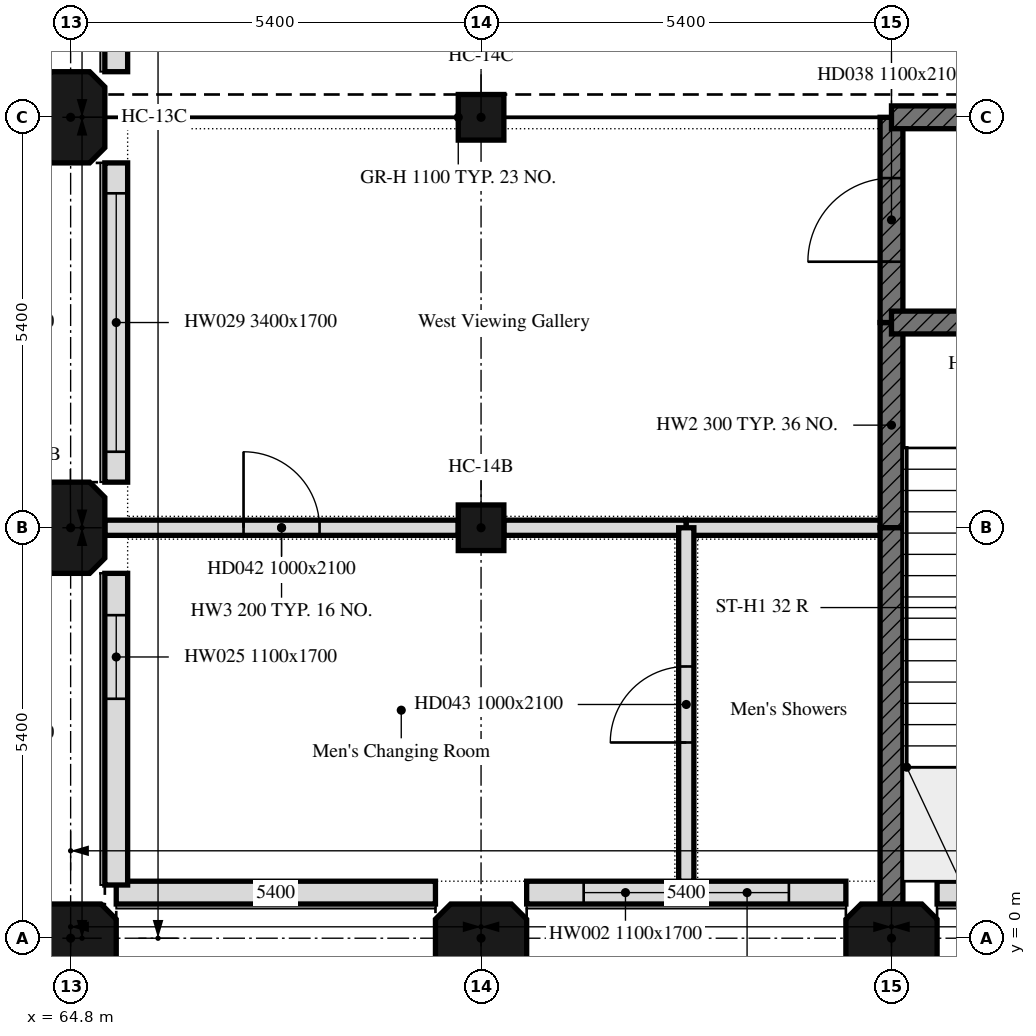
"""IFC4 building model, lengths in metres.
Left out: names, types, materials, properties, quantities, classifications, styles, units other than length and angle.
Written with IfcOpenShell. Run it as: python <this file> out.ifc"""

import sys

from ifc_helpers import new_model, si_unit, direction, frame, frame_2d, origin, origin_2d, place, context, subcontext, project, spatial, polyline, rectangle, outline, extrude, element, fill, save


model = new_model("IFC4")
c1 = context("Model", 3, precision=1e-05, world=origin(), true_north=direction((0.0, 1.0)))
c2 = subcontext(c1, "Body", "Model", "MODEL_VIEW")
j1 = project(units=[si_unit("LENGTHUNIT", "METRE"), si_unit("PLANEANGLEUNIT", "RADIAN")], contexts=[c1])
p1 = place(None, origin())
s1 = spatial("IfcSite", under=j1, at=p1, CompositionType="ELEMENT")
p2 = place(p1, origin())
s2 = spatial("IfcBuilding", under=s1, at=p2, CompositionType="ELEMENT")
p3 = place(p2, frame((0.0, 0.0, 8.4)))
s3 = spatial("IfcBuildingStorey", under=s2, at=p3, CompositionType="ELEMENT", Elevation=8.4)
for number, where, z_axis, x_axis in (
    (1, (64.8, 0.0, 0.0), (0.0, 0.0, 1.0), (1.0, 0.0, 0.0)),
    (2, (64.8, 5.4, 0.0), (0.0, 0.0, 1.0), (0.0, 1.0, 0.0)),
    (3, (64.8, 10.8, 0.0), (0.0, 0.0, 1.0), (0.0, 1.0, 0.0)),
    (4, (70.2, 0.0, 0.0), (0.0, 0.0, 1.0), (1.0, 0.0, 0.0)),
):
    element("IfcColumn", number, at=place(p3, frame(where, z_axis=z_axis, x_axis=x_axis)), inside=s3, PredefinedType="COLUMN", context=c2, shape_type="SweptSolid", body=[
        extrude(outline(polyline([(-0.4, -0.45), (0.4, -0.45), (0.6, -0.25), (0.6, 0.25), (0.4, 0.45), (-0.4, 0.45), (-0.6, 0.25), (-0.6, -0.25), (-0.4, -0.45)])), origin(), (0.0, 0.0, 1.0), 5.7),
    ])
for number, where, z_axis, x_axis in (
    (5, (70.2, 5.4, 0.0), (0.0, 0.0, 1.0), (1.0, 0.0, 0.0)),
    (6, (70.2, 10.8, 0.0), (0.0, 0.0, 1.0), (1.0, 0.0, 0.0)),
):
    element("IfcColumn", number, at=place(p3, frame(where, z_axis=z_axis, x_axis=x_axis)), inside=s3, PredefinedType="COLUMN", context=c2, shape_type="SweptSolid", body=[
        extrude(rectangle(XDim=0.6, YDim=0.6, at=origin_2d()), origin(), (0.0, 0.0, 1.0), 5.7),
    ])
p4 = place(p3, frame((75.6, 0.0, 0.0), z_axis=(0.0, 0.0, 1.0), x_axis=(1.0, 0.0, 0.0)))
e7 = element("IfcColumn", 7, at=p4, inside=s3, PredefinedType="COLUMN", context=c2, shape_type="SweptSolid", body=[
    extrude(outline(polyline([(-0.4, -0.45), (0.4, -0.45), (0.6, -0.25), (0.6, 0.25), (0.4, 0.45), (-0.4, 0.45), (-0.6, 0.25), (-0.6, -0.25), (-0.4, -0.45)])), origin(), (0.0, 0.0, 1.0), 5.7),
])
p5 = place(p3, frame((65.4, 0.6, 0.0), z_axis=(0.0, 0.0, 1.0), x_axis=(1.0, 0.0, 0.0)))
e8 = element("IfcWall", 8, at=p5, inside=s3, PredefinedType="SOLIDWALL", context=c2, shape_type="SweptSolid", body=[
    extrude(rectangle(XDim=4.2, YDim=0.3, at=frame_2d((2.1, 0.0))), origin(), (0.0, 0.0, 1.0), 5.7),
])
p6 = place(p3, frame((70.8, 0.6, 0.0), z_axis=(0.0, 0.0, 1.0), x_axis=(1.0, 0.0, 0.0)))
e9 = element("IfcWall", 9, at=p6, inside=s3, PredefinedType="SOLIDWALL", context=c2, shape_type="SweptSolid", body=[
    extrude(rectangle(XDim=4.2, YDim=0.3, at=frame_2d((2.1, 0.0))), origin(), (0.0, 0.0, 1.0), 5.7),
])
p7 = place(p6, frame((0.75, 0.0, 0.9)))
e10 = element("IfcOpeningElement", 10, at=p7, cuts=e9, PredefinedType="OPENING", context=c2, shape_type="SweptSolid", body=[
    extrude(rectangle(XDim=1.1, YDim=1.7, at=frame_2d((0.55, 0.85))), frame((0.0, 0.15, 0.0), z_axis=(0.0, -1.0, 0.0), x_axis=(1.0, 0.0, 0.0)), (0.0, 0.0, 1.0), 0.3),
])
p8 = place(p6, frame((2.35, 0.0, 0.9)))
e11 = element("IfcOpeningElement", 11, at=p8, cuts=e9, PredefinedType="OPENING", context=c2, shape_type="SweptSolid", body=[
    extrude(rectangle(XDim=1.1, YDim=1.7, at=frame_2d((0.55, 0.85))), frame((0.0, 0.15, 0.0), z_axis=(0.0, -1.0, 0.0), x_axis=(1.0, 0.0, 0.0)), (0.0, 0.0, 1.0), 0.3),
])
p9 = place(p3, frame((76.2, 0.6, 0.0), z_axis=(0.0, 0.0, 1.0), x_axis=(1.0, 0.0, 0.0)))
e12 = element("IfcWall", 12, at=p9, inside=s3, PredefinedType="SOLIDWALL", context=c2, shape_type="SweptSolid", body=[
    extrude(rectangle(XDim=4.2, YDim=0.3, at=frame_2d((2.1, 0.0))), origin(), (0.0, 0.0, 1.0), 5.7),
])
p10 = place(p3, frame((65.4, 0.7, 0.0), z_axis=(0.0, 0.0, 1.0), x_axis=(0.0, 1.0, 0.0)))
e13 = element("IfcWall", 13, at=p10, inside=s3, PredefinedType="SOLIDWALL", context=c2, shape_type="SweptSolid", body=[
    extrude(rectangle(XDim=4.1, YDim=0.3, at=frame_2d((2.05, 0.0))), origin(), (0.0, 0.0, 1.0), 5.7),
])
p11 = place(p10, frame((2.45, 0.0, 0.9)))
e14 = element("IfcOpeningElement", 14, at=p11, cuts=e13, PredefinedType="OPENING", context=c2, shape_type="SweptSolid", body=[
    extrude(rectangle(XDim=1.1, YDim=1.7, at=frame_2d((0.55, 0.85))), frame((0.0, 0.15, 0.0), z_axis=(0.0, -1.0, 0.0), x_axis=(1.0, 0.0, 0.0)), (0.0, 0.0, 1.0), 0.3),
])
p12 = place(p3, frame((65.4, 6.0, 0.0), z_axis=(0.0, 0.0, 1.0), x_axis=(0.0, 1.0, 0.0)))
e15 = element("IfcWall", 15, at=p12, inside=s3, PredefinedType="SOLIDWALL", context=c2, shape_type="SweptSolid", body=[
    extrude(rectangle(XDim=4.2, YDim=0.3, at=frame_2d((2.1, 0.0))), origin(), (0.0, 0.0, 1.0), 5.7),
])
p13 = place(p12, frame((0.4, 0.0, 0.9)))
e16 = element("IfcOpeningElement", 16, at=p13, cuts=e15, PredefinedType="OPENING", context=c2, shape_type="SweptSolid", body=[
    extrude(rectangle(XDim=3.4, YDim=1.7, at=frame_2d((1.7, 0.85))), frame((0.0, 0.15, 0.0), z_axis=(0.0, -1.0, 0.0), x_axis=(1.0, 0.0, 0.0)), (0.0, 0.0, 1.0), 0.3),
])
p14 = place(p3, frame((65.4, 11.4, 0.0), z_axis=(0.0, 0.0, 1.0), x_axis=(0.0, 1.0, 0.0)))
e17 = element("IfcWall", 17, at=p14, inside=s3, PredefinedType="SOLIDWALL", context=c2, shape_type="SweptSolid", body=[
    extrude(rectangle(XDim=4.2, YDim=0.3, at=frame_2d((2.1, 0.0))), origin(), (0.0, 0.0, 1.0), 6.0),
])
p15 = place(p3, frame((65.25, 5.4, 0.0), z_axis=(0.0, 0.0, 1.0), x_axis=(1.0, 0.0, 0.0)))
e18 = element("IfcWall", 18, at=p15, inside=s3, PredefinedType="PARTITIONING", context=c2, shape_type="SweptSolid", body=[
    extrude(rectangle(XDim=4.65, YDim=0.2, at=frame_2d((2.325, 0.0))), origin(), (0.0, 0.0, 1.0), 5.7),
])
p16 = place(p15, frame((1.825, 0.0, 0.0)))
e19 = element("IfcOpeningElement", 19, at=p16, cuts=e18, PredefinedType="OPENING", context=c2, shape_type="SweptSolid", body=[
    extrude(rectangle(XDim=1.0, YDim=2.1, at=frame_2d((0.5, 1.05))), frame((0.0, 0.1, 0.0), z_axis=(0.0, -1.0, 0.0), x_axis=(1.0, 0.0, 0.0)), (0.0, 0.0, 1.0), 0.2),
])
p17 = place(p3, frame((70.5, 5.4, 0.0), z_axis=(0.0, 0.0, 1.0), x_axis=(1.0, 0.0, 0.0)))
e20 = element("IfcWall", 20, at=p17, inside=s3, PredefinedType="PARTITIONING", context=c2, shape_type="SweptSolid", body=[
    extrude(rectangle(XDim=2.4, YDim=0.2, at=frame_2d((1.2, 0.0))), origin(), (0.0, 0.0, 1.0), 5.7),
])
p18 = place(p3, frame((72.9, 5.4, 0.0), z_axis=(0.0, 0.0, 1.0), x_axis=(1.0, 0.0, 0.0)))
e21 = element("IfcWall", 21, at=p18, inside=s3, PredefinedType="PARTITIONING", context=c2, shape_type="SweptSolid", body=[
    extrude(rectangle(XDim=2.7, YDim=0.2, at=frame_2d((1.35, 0.0))), origin(), (0.0, 0.0, 1.0), 5.7),
])
p19 = place(p3, frame((75.6, 5.4, 0.0), z_axis=(0.0, 0.0, 1.0), x_axis=(0.0, 1.0, 0.0)))
e22 = element("IfcWall", 22, at=p19, inside=s3, PredefinedType="SHEAR", context=c2, shape_type="SweptSolid", body=[
    extrude(rectangle(XDim=2.7, YDim=0.3, at=frame_2d((1.35, 0.0))), origin(), (0.0, 0.0, 1.0), 5.7),
])
p20 = place(p3, frame((75.6, 8.1, 0.0), z_axis=(0.0, 0.0, 1.0), x_axis=(0.0, 1.0, 0.0)))
e23 = element("IfcWall", 23, at=p20, inside=s3, PredefinedType="SHEAR", context=c2, shape_type="SweptSolid", body=[
    extrude(rectangle(XDim=2.7, YDim=0.3, at=frame_2d((1.35, 0.0))), origin(), (0.0, 0.0, 1.0), 5.7),
])
p21 = place(p20, frame((0.8, 0.0, 0.0)))
e24 = element("IfcOpeningElement", 24, at=p21, cuts=e23, PredefinedType="OPENING", context=c2, shape_type="SweptSolid", body=[
    extrude(rectangle(XDim=1.1, YDim=2.1, at=frame_2d((0.55, 1.05))), frame((0.0, 0.15, 0.0), z_axis=(0.0, -1.0, 0.0), x_axis=(1.0, 0.0, 0.0)), (0.0, 0.0, 1.0), 0.3),
])
p22 = place(p3, frame((72.9, 0.75, 0.0), z_axis=(0.0, 0.0, 1.0), x_axis=(0.0, 1.0, 0.0)))
e25 = element("IfcWall", 25, at=p22, inside=s3, PredefinedType="PARTITIONING", context=c2, shape_type="SweptSolid", body=[
    extrude(rectangle(XDim=4.65, YDim=0.2, at=frame_2d((2.325, 0.0))), origin(), (0.0, 0.0, 1.0), 5.7),
])
p23 = place(p22, frame((1.825, 0.0, 0.0)))
e26 = element("IfcOpeningElement", 26, at=p23, cuts=e25, PredefinedType="OPENING", context=c2, shape_type="SweptSolid", body=[
    extrude(rectangle(XDim=1.0, YDim=2.1, at=frame_2d((0.5, 1.05))), frame((0.0, 0.1, 0.0), z_axis=(0.0, -1.0, 0.0), x_axis=(1.0, 0.0, 0.0)), (0.0, 0.0, 1.0), 0.2),
])
p24 = place(p3, frame((75.6, 0.45, 0.0), z_axis=(0.0, 0.0, 1.0), x_axis=(0.0, 1.0, 0.0)))
e27 = element("IfcWall", 27, at=p24, inside=s3, PredefinedType="SHEAR", context=c2, shape_type="SweptSolid", body=[
    extrude(rectangle(XDim=4.95, YDim=0.3, at=frame_2d((2.475, 0.0))), origin(), (0.0, 0.0, 1.0), 5.7),
])
p25 = place(p3, frame((75.6, 8.1, 0.0), z_axis=(0.0, 0.0, 1.0), x_axis=(1.0, 0.0, 0.0)))
e28 = element("IfcWall", 28, at=p25, inside=s3, PredefinedType="SHEAR", context=c2, shape_type="SweptSolid", body=[
    extrude(rectangle(XDim=3.45, YDim=0.3, at=frame_2d((1.725, 0.0))), origin(), (0.0, 0.0, 1.0), 5.7),
])
p26 = place(p25, frame((1.175, 0.0, 0.0)))
e29 = element("IfcOpeningElement", 29, at=p26, cuts=e28, PredefinedType="OPENING", context=c2, shape_type="SweptSolid", body=[
    extrude(rectangle(XDim=1.1, YDim=2.1, at=frame_2d((0.55, 1.05))), frame((0.0, 0.15, 0.0), z_axis=(0.0, -1.0, 0.0), x_axis=(1.0, 0.0, 0.0)), (0.0, 0.0, 1.0), 0.3),
])
p27 = place(p3, frame((75.6, 10.8, 0.0), z_axis=(0.0, 0.0, 1.0), x_axis=(1.0, 0.0, 0.0)))
e30 = element("IfcWall", 30, at=p27, inside=s3, PredefinedType="SHEAR", context=c2, shape_type="SweptSolid", body=[
    extrude(rectangle(XDim=5.4, YDim=0.3, at=frame_2d((2.7, 0.0))), origin(), (0.0, 0.0, 1.0), 5.7),
])
p28 = place(p7, origin())
e31 = element("IfcWindow", 31, at=p28, inside=s3, PartitioningType="SINGLE_PANEL", PredefinedType="WINDOW", context=c2, shape_type="SweptSolid", body=[
    extrude(rectangle(XDim=1.1, YDim=1.7, at=frame_2d((0.55, 0.85))), frame((0.0, 0.03, 0.0), z_axis=(0.0, -1.0, 0.0), x_axis=(1.0, 0.0, 0.0)), (0.0, 0.0, 1.0), 0.06),
])
fill(e10, e31)
p29 = place(p8, origin())
e32 = element("IfcWindow", 32, at=p29, inside=s3, PartitioningType="SINGLE_PANEL", PredefinedType="WINDOW", context=c2, shape_type="SweptSolid", body=[
    extrude(rectangle(XDim=1.1, YDim=1.7, at=frame_2d((0.55, 0.85))), frame((0.0, 0.03, 0.0), z_axis=(0.0, -1.0, 0.0), x_axis=(1.0, 0.0, 0.0)), (0.0, 0.0, 1.0), 0.06),
])
fill(e11, e32)
p30 = place(p11, origin())
e33 = element("IfcWindow", 33, at=p30, inside=s3, PartitioningType="SINGLE_PANEL", PredefinedType="WINDOW", context=c2, shape_type="SweptSolid", body=[
    extrude(rectangle(XDim=1.1, YDim=1.7, at=frame_2d((0.55, 0.85))), frame((0.0, 0.03, 0.0), z_axis=(0.0, -1.0, 0.0), x_axis=(1.0, 0.0, 0.0)), (0.0, 0.0, 1.0), 0.06),
])
fill(e14, e33)
p31 = place(p13, origin())
e34 = element("IfcWindow", 34, at=p31, inside=s3, PartitioningType="SINGLE_PANEL", PredefinedType="WINDOW", context=c2, shape_type="SweptSolid", body=[
    extrude(rectangle(XDim=3.4, YDim=1.7, at=frame_2d((1.7, 0.85))), frame((0.0, 0.03, 0.0), z_axis=(0.0, -1.0, 0.0), x_axis=(1.0, 0.0, 0.0)), (0.0, 0.0, 1.0), 0.06),
])
fill(e16, e34)
p32 = place(p21, origin())
e35 = element("IfcDoor", 35, at=p32, inside=s3, OperationType="SINGLE_SWING_LEFT", PredefinedType="DOOR", context=c2, shape_type="SweptSolid", body=[
    extrude(rectangle(XDim=1.1, YDim=2.1, at=frame_2d((0.55, 1.05))), frame((0.0, 0.025, 0.0), z_axis=(0.0, -1.0, 0.0), x_axis=(1.0, 0.0, 0.0)), (0.0, 0.0, 1.0), 0.05),
])
fill(e24, e35)
p33 = place(p16, origin())
e36 = element("IfcDoor", 36, at=p33, inside=s3, OperationType="SINGLE_SWING_LEFT", PredefinedType="DOOR", context=c2, shape_type="SweptSolid", body=[
    extrude(rectangle(XDim=1.0, YDim=2.1, at=frame_2d((0.5, 1.05))), frame((0.0, 0.025, 0.0), z_axis=(0.0, -1.0, 0.0), x_axis=(1.0, 0.0, 0.0)), (0.0, 0.0, 1.0), 0.05),
])
fill(e19, e36)
p34 = place(p23, origin())
e37 = element("IfcDoor", 37, at=p34, inside=s3, OperationType="SINGLE_SWING_LEFT", PredefinedType="DOOR", context=c2, shape_type="SweptSolid", body=[
    extrude(rectangle(XDim=1.0, YDim=2.1, at=frame_2d((0.5, 1.05))), frame((0.0, 0.025, 0.0), z_axis=(0.0, -1.0, 0.0), x_axis=(1.0, 0.0, 0.0)), (0.0, 0.0, 1.0), 0.05),
])
fill(e26, e37)
save(model, sys.argv[1])
